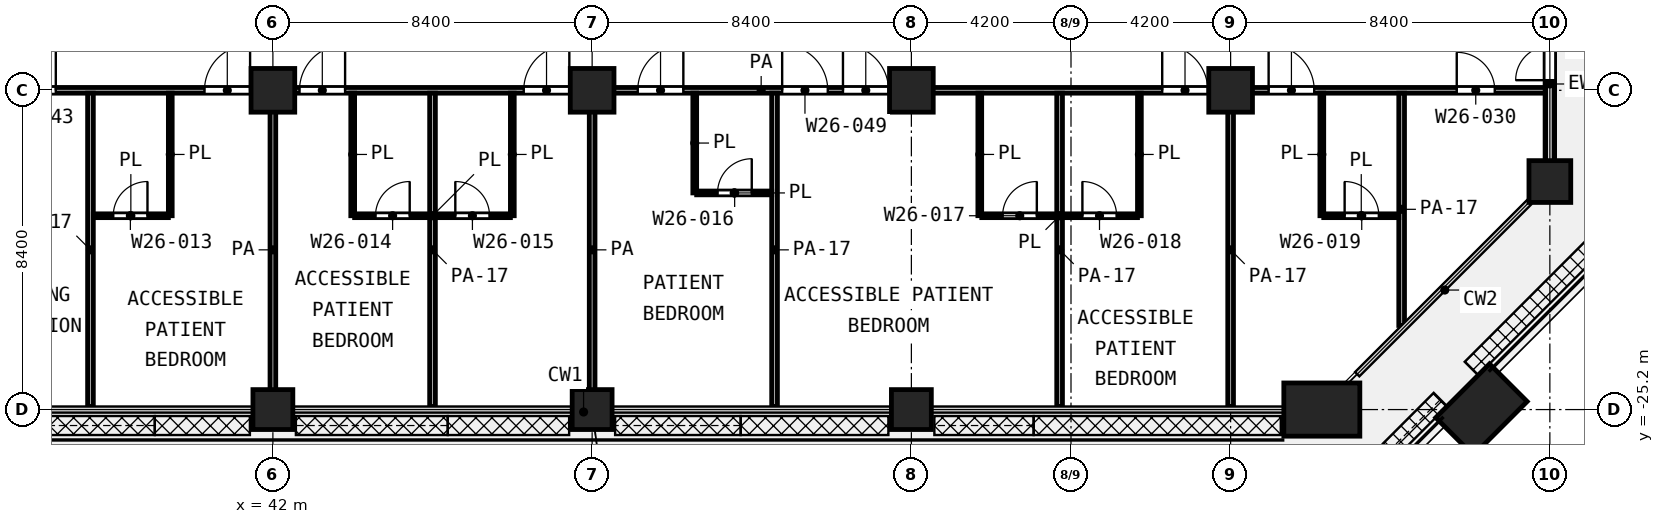
"""IFC4 building model, lengths in metres.
Left out: names, types, materials, properties, quantities, classifications, styles, units other than length and angle.
Written with IfcOpenShell. Run it as: python <this file> out.ifc"""

import sys

from ifc_helpers import new_model, si_unit, direction, frame, frame_2d, origin, origin_2d, place, context, subcontext, project, spatial, rectangle, extrude, element, fill, save


model = new_model("IFC4")
c1 = context("Model", 3, precision=1e-05, world=origin(), true_north=direction((0.0, 1.0)))
c2 = subcontext(c1, "Body", "Model", "MODEL_VIEW")
j1 = project(units=[si_unit("LENGTHUNIT", "METRE"), si_unit("PLANEANGLEUNIT", "RADIAN")], contexts=[c1])
p1 = place(None, origin())
s1 = spatial("IfcSite", under=j1, at=p1, CompositionType="ELEMENT")
p2 = place(p1, origin())
s2 = spatial("IfcBuilding", under=s1, at=p2, CompositionType="ELEMENT")
p3 = place(p2, frame((0.0, 0.0, 115.6)))
s3 = spatial("IfcBuildingStorey", under=s2, at=p3, CompositionType="ELEMENT", Elevation=115.6)
for number, where, z_axis, x_axis in (
    (1, (42.0, -16.8, 0.0), (0.0, 0.0, 1.0), (1.0, 0.0, 0.0)),
    (2, (50.4, -16.8, 0.0), (0.0, 0.0, 1.0), (1.0, 0.0, 0.0)),
    (3, (58.8, -16.8, 0.0), (0.0, 0.0, 1.0), (1.0, 0.0, 0.0)),
    (4, (67.2, -16.8, 0.0), (0.0, 0.0, 1.0), (1.0, 0.0, 0.0)),
):
    element("IfcColumn", number, at=place(p3, frame(where, z_axis=z_axis, x_axis=x_axis)), inside=s3, PredefinedType="COLUMN", context=c2, shape_type="SweptSolid", body=[
        extrude(rectangle(XDim=1.15, YDim=1.15, at=origin_2d()), origin(), (0.0, 0.0, 1.0), 4.2),
    ])
p4 = place(p3, frame((75.6, -19.2, 0.0), z_axis=(0.0, 0.0, 1.0), x_axis=(1.0, 0.0, 0.0)))
e5 = element("IfcColumn", 5, at=p4, inside=s3, PredefinedType="COLUMN", context=c2, shape_type="SweptSolid", body=[
    extrude(rectangle(XDim=1.1, YDim=1.1, at=origin_2d()), origin(), (0.0, 0.0, 1.0), 4.2),
])
for number, where, z_axis, x_axis in (
    (6, (42.0, -25.2, 0.0), (0.0, 0.0, 1.0), (1.0, 0.0, 0.0)),
    (7, (50.4, -25.2, 0.0), (0.0, 0.0, 1.0), (1.0, 0.0, 0.0)),
    (8, (58.8, -25.2, 0.0), (0.0, 0.0, 1.0), (1.0, 0.0, 0.0)),
):
    element("IfcColumn", number, at=place(p3, frame(where, z_axis=z_axis, x_axis=x_axis)), inside=s3, PredefinedType="COLUMN", context=c2, shape_type="SweptSolid", body=[
        extrude(rectangle(XDim=1.05, YDim=1.05, at=origin_2d()), origin(), (0.0, 0.0, 1.0), 4.2),
    ])
for number, where, z_axis, x_axis in (
    (9, (69.6, -25.2, 0.0), (0.0, 0.0, 1.0), (-1.0, 0.0, 0.0)),
    (10, (73.8, -25.2, 0.0), (0.0, 0.0, 1.0), (-0.707, -0.707, 0.0)),
):
    element("IfcColumn", number, at=place(p3, frame(where, z_axis=z_axis, x_axis=x_axis)), inside=s3, PredefinedType="COLUMN", context=c2, shape_type="SweptSolid", body=[
        extrude(rectangle(XDim=2.0, YDim=1.4, at=origin_2d()), origin(), (0.0, 0.0, 1.0), 4.2),
    ])
p5 = place(p3, frame((75.6, -18.65, 0.0), z_axis=(0.0, 0.0, 1.0), x_axis=(0.0, 1.0, 0.0)))
e11 = element("IfcWall", 11, at=p5, inside=s3, PredefinedType="SOLIDWALL", context=c2, shape_type="SweptSolid", body=[
    extrude(rectangle(XDim=4.033, YDim=0.25, at=frame_2d((2.017, 0.0))), origin(), (0.0, 0.0, 1.0), 3.48),
])
p6 = place(p5, frame((2.117, 0.0, 0.0)))
e12 = element("IfcOpeningElement", 12, at=p6, cuts=e11, PredefinedType="OPENING", context=c2, shape_type="SweptSolid", body=[
    extrude(rectangle(XDim=1.8, YDim=2.1, at=frame_2d((0.9, 1.05))), frame((0.0, 0.135, 0.0), z_axis=(0.0, -1.0, 0.0), x_axis=(1.0, 0.0, 0.0)), (0.0, 0.0, 1.0), 0.27),
])
p7 = place(p3, frame((37.275, -20.1, 0.0), z_axis=(0.0, 0.0, 1.0), x_axis=(1.0, 0.0, 0.0)))
e13 = element("IfcWall", 13, at=p7, inside=s3, PredefinedType="PARTITIONING", context=c2, shape_type="SweptSolid", body=[
    extrude(rectangle(XDim=1.975, YDim=0.1, at=frame_2d((0.988, 0.0))), origin(), (0.0, 0.0, 1.0), 3.6),
])
p8 = place(p7, frame((0.525, 0.0, 0.0)))
e14 = element("IfcOpeningElement", 14, at=p8, cuts=e13, PredefinedType="OPENING", context=c2, shape_type="SweptSolid", body=[
    extrude(rectangle(XDim=0.9, YDim=2.1, at=frame_2d((0.45, 1.05))), frame((0.0, 0.06, 0.0), z_axis=(0.0, -1.0, 0.0), x_axis=(1.0, 0.0, 0.0)), (0.0, 0.0, 1.0), 0.12),
])
p9 = place(p3, frame((44.15, -20.1, 0.0), z_axis=(0.0, 0.0, 1.0), x_axis=(1.0, 0.0, 0.0)))
e15 = element("IfcWall", 15, at=p9, inside=s3, PredefinedType="PARTITIONING", context=c2, shape_type="SweptSolid", body=[
    extrude(rectangle(XDim=4.1, YDim=0.1, at=frame_2d((2.05, 0.0))), origin(), (0.0, 0.0, 1.0), 3.6),
])
p10 = place(p9, frame((0.55, 0.0, 0.0)))
e16 = element("IfcOpeningElement", 16, at=p10, cuts=e15, PredefinedType="OPENING", context=c2, shape_type="SweptSolid", body=[
    extrude(rectangle(XDim=0.9, YDim=2.1, at=frame_2d((0.45, 1.05))), frame((0.0, 0.06, 0.0), z_axis=(0.0, -1.0, 0.0), x_axis=(1.0, 0.0, 0.0)), (0.0, 0.0, 1.0), 0.12),
])
p11 = place(p9, frame((2.65, 0.0, 0.0)))
e17 = element("IfcOpeningElement", 17, at=p11, cuts=e15, PredefinedType="OPENING", context=c2, shape_type="SweptSolid", body=[
    extrude(rectangle(XDim=0.9, YDim=2.1, at=frame_2d((0.45, 1.05))), frame((0.0, 0.06, 0.0), z_axis=(0.0, -1.0, 0.0), x_axis=(1.0, 0.0, 0.0)), (0.0, 0.0, 1.0), 0.12),
])
p12 = place(p3, frame((60.652, -20.1, 0.0), z_axis=(0.0, 0.0, 1.0), x_axis=(1.0, 0.0, 0.0)))
e18 = element("IfcWall", 18, at=p12, inside=s3, PredefinedType="PARTITIONING", context=c2, shape_type="SweptSolid", body=[
    extrude(rectangle(XDim=4.098, YDim=0.1, at=frame_2d((2.049, 0.0))), origin(), (0.0, 0.0, 1.0), 3.6),
])
p13 = place(p12, frame((0.549, 0.0, 0.0)))
e19 = element("IfcOpeningElement", 19, at=p13, cuts=e18, PredefinedType="OPENING", context=c2, shape_type="SweptSolid", body=[
    extrude(rectangle(XDim=0.9, YDim=2.1, at=frame_2d((0.45, 1.05))), frame((0.0, 0.06, 0.0), z_axis=(0.0, -1.0, 0.0), x_axis=(1.0, 0.0, 0.0)), (0.0, 0.0, 1.0), 0.12),
])
p14 = place(p12, frame((2.648, 0.0, 0.0)))
e20 = element("IfcOpeningElement", 20, at=p14, cuts=e18, PredefinedType="OPENING", context=c2, shape_type="SweptSolid", body=[
    extrude(rectangle(XDim=0.9, YDim=2.1, at=frame_2d((0.45, 1.05))), frame((0.0, 0.06, 0.0), z_axis=(0.0, -1.0, 0.0), x_axis=(1.0, 0.0, 0.0)), (0.0, 0.0, 1.0), 0.12),
])
p15 = place(p3, frame((69.65, -20.1, 0.0), z_axis=(0.0, 0.0, 1.0), x_axis=(1.0, 0.0, 0.0)))
e21 = element("IfcWall", 21, at=p15, inside=s3, PredefinedType="PARTITIONING", context=c2, shape_type="SweptSolid", body=[
    extrude(rectangle(XDim=1.975, YDim=0.1, at=frame_2d((0.988, 0.0))), origin(), (0.0, 0.0, 1.0), 3.6),
])
p16 = place(p15, frame((0.55, 0.0, 0.0)))
e22 = element("IfcOpeningElement", 22, at=p16, cuts=e21, PredefinedType="OPENING", context=c2, shape_type="SweptSolid", body=[
    extrude(rectangle(XDim=0.9, YDim=2.1, at=frame_2d((0.45, 1.05))), frame((0.0, 0.06, 0.0), z_axis=(0.0, -1.0, 0.0), x_axis=(1.0, 0.0, 0.0)), (0.0, 0.0, 1.0), 0.12),
])
p17 = place(p3, frame((53.15, -19.5, 0.0), z_axis=(0.0, 0.0, 1.0), x_axis=(1.0, 0.0, 0.0)))
e23 = element("IfcWall", 23, at=p17, inside=s3, PredefinedType="PARTITIONING", context=c2, shape_type="SweptSolid", body=[
    extrude(rectangle(XDim=1.975, YDim=0.1, at=frame_2d((0.988, 0.0))), origin(), (0.0, 0.0, 1.0), 3.6),
])
p18 = place(p17, frame((0.55, 0.0, 0.0)))
e24 = element("IfcOpeningElement", 24, at=p18, cuts=e23, PredefinedType="OPENING", context=c2, shape_type="SweptSolid", body=[
    extrude(rectangle(XDim=0.9, YDim=2.1, at=frame_2d((0.45, 1.05))), frame((0.0, 0.06, 0.0), z_axis=(0.0, -1.0, 0.0), x_axis=(1.0, 0.0, 0.0)), (0.0, 0.0, 1.0), 0.12),
])
for number, where, z_axis, x_axis in (
    (25, (39.3, -20.1, 0.0), (0.0, 0.0, 1.0), (0.0, 1.0, 0.0)),
    (26, (44.1, -20.1, 0.0), (0.0, 0.0, 1.0), (0.0, 1.0, 0.0)),
    (27, (48.3, -20.1, 0.0), (0.0, 0.0, 1.0), (0.0, 1.0, 0.0)),
):
    element("IfcWall", number, at=place(p3, frame(where, z_axis=z_axis, x_axis=x_axis)), inside=s3, PredefinedType="PARTITIONING", context=c2, shape_type="SweptSolid", body=[
        extrude(rectangle(XDim=3.225, YDim=0.1, at=frame_2d((1.613, 0.0))), origin(), (0.0, 0.0, 1.0), 3.6),
    ])
p19 = place(p3, frame((53.1, -19.5, 0.0), z_axis=(0.0, 0.0, 1.0), x_axis=(0.0, 1.0, 0.0)))
e28 = element("IfcWall", 28, at=p19, inside=s3, PredefinedType="PARTITIONING", context=c2, shape_type="SweptSolid", body=[
    extrude(rectangle(XDim=2.625, YDim=0.1, at=frame_2d((1.312, 0.0))), origin(), (0.0, 0.0, 1.0), 3.6),
])
p20 = place(p3, frame((60.6, -20.099, 0.0), z_axis=(0.0, 0.0, 1.0), x_axis=(0.0, 1.0, 0.0)))
e29 = element("IfcWall", 29, at=p20, inside=s3, PredefinedType="PARTITIONING", context=c2, shape_type="SweptSolid", body=[
    extrude(rectangle(XDim=3.224, YDim=0.1, at=frame_2d((1.612, 0.0))), origin(), (0.0, 0.0, 1.0), 3.6),
])
for number, where, z_axis, x_axis in (
    (30, (64.8, -20.1, 0.0), (0.0, 0.0, 1.0), (0.0, 1.0, 0.0)),
    (31, (69.6, -20.1, 0.0), (0.0, 0.0, 1.0), (0.0, 1.0, 0.0)),
):
    element("IfcWall", number, at=place(p3, frame(where, z_axis=z_axis, x_axis=x_axis)), inside=s3, PredefinedType="PARTITIONING", context=c2, shape_type="SweptSolid", body=[
        extrude(rectangle(XDim=3.225, YDim=0.1, at=frame_2d((1.613, 0.0))), origin(), (0.0, 0.0, 1.0), 3.6),
    ])
p21 = place(p3, frame((34.175, -16.8, 0.0), z_axis=(0.0, 0.0, 1.0), x_axis=(1.0, 0.0, 0.0)))
e32 = element("IfcWall", 32, at=p21, inside=s3, PredefinedType="PARTITIONING", context=c2, shape_type="SweptSolid", body=[
    extrude(rectangle(XDim=41.345, YDim=0.15, at=frame_2d((20.672, 0.0))), origin(), (0.0, 0.0, 1.0), 3.6),
])
p22 = place(p21, frame((0.913, 0.0, 0.0)))
e33 = element("IfcOpeningElement", 33, at=p22, cuts=e32, PredefinedType="OPENING", context=c2, shape_type="SweptSolid", body=[
    extrude(rectangle(XDim=1.2, YDim=2.1, at=frame_2d((0.6, 1.05))), frame((0.0, 0.085, 0.0), z_axis=(0.0, -1.0, 0.0), x_axis=(1.0, 0.0, 0.0)), (0.0, 0.0, 1.0), 0.17),
])
p23 = place(p21, frame((6.025, 0.0, 0.0)))
e34 = element("IfcOpeningElement", 34, at=p23, cuts=e32, PredefinedType="OPENING", context=c2, shape_type="SweptSolid", body=[
    extrude(rectangle(XDim=1.2, YDim=2.1, at=frame_2d((0.6, 1.05))), frame((0.0, 0.085, 0.0), z_axis=(0.0, -1.0, 0.0), x_axis=(1.0, 0.0, 0.0)), (0.0, 0.0, 1.0), 0.17),
])
p24 = place(p21, frame((8.525, 0.0, 0.0)))
e35 = element("IfcOpeningElement", 35, at=p24, cuts=e32, PredefinedType="OPENING", context=c2, shape_type="SweptSolid", body=[
    extrude(rectangle(XDim=1.2, YDim=2.1, at=frame_2d((0.6, 1.05))), frame((0.0, 0.085, 0.0), z_axis=(0.0, -1.0, 0.0), x_axis=(1.0, 0.0, 0.0)), (0.0, 0.0, 1.0), 0.17),
])
p25 = place(p21, frame((14.425, 0.0, 0.0)))
e36 = element("IfcOpeningElement", 36, at=p25, cuts=e32, PredefinedType="OPENING", context=c2, shape_type="SweptSolid", body=[
    extrude(rectangle(XDim=1.2, YDim=2.1, at=frame_2d((0.6, 1.05))), frame((0.0, 0.085, 0.0), z_axis=(0.0, -1.0, 0.0), x_axis=(1.0, 0.0, 0.0)), (0.0, 0.0, 1.0), 0.17),
])
p26 = place(p21, frame((17.425, 0.0, 0.0)))
e37 = element("IfcOpeningElement", 37, at=p26, cuts=e32, PredefinedType="OPENING", context=c2, shape_type="SweptSolid", body=[
    extrude(rectangle(XDim=1.2, YDim=2.1, at=frame_2d((0.6, 1.05))), frame((0.0, 0.085, 0.0), z_axis=(0.0, -1.0, 0.0), x_axis=(1.0, 0.0, 0.0)), (0.0, 0.0, 1.0), 0.17),
])
p27 = place(p21, frame((22.825, 0.0, 0.0)))
e38 = element("IfcOpeningElement", 38, at=p27, cuts=e32, PredefinedType="OPENING", context=c2, shape_type="SweptSolid", body=[
    extrude(rectangle(XDim=1.2, YDim=2.1, at=frame_2d((0.6, 1.05))), frame((0.0, 0.085, 0.0), z_axis=(0.0, -1.0, 0.0), x_axis=(1.0, 0.0, 0.0)), (0.0, 0.0, 1.0), 0.17),
])
p28 = place(p21, frame((21.225, 0.0, 0.0)))
e39 = element("IfcOpeningElement", 39, at=p28, cuts=e32, PredefinedType="OPENING", context=c2, shape_type="SweptSolid", body=[
    extrude(rectangle(XDim=1.2, YDim=2.1, at=frame_2d((0.6, 1.05))), frame((0.0, 0.085, 0.0), z_axis=(0.0, -1.0, 0.0), x_axis=(1.0, 0.0, 0.0)), (0.0, 0.0, 1.0), 0.17),
])
p29 = place(p21, frame((31.225, 0.0, 0.0)))
e40 = element("IfcOpeningElement", 40, at=p29, cuts=e32, PredefinedType="OPENING", context=c2, shape_type="SweptSolid", body=[
    extrude(rectangle(XDim=1.2, YDim=2.1, at=frame_2d((0.6, 1.05))), frame((0.0, 0.085, 0.0), z_axis=(0.0, -1.0, 0.0), x_axis=(1.0, 0.0, 0.0)), (0.0, 0.0, 1.0), 0.17),
])
p30 = place(p21, frame((34.025, 0.0, 0.0)))
e41 = element("IfcOpeningElement", 41, at=p30, cuts=e32, PredefinedType="OPENING", context=c2, shape_type="SweptSolid", body=[
    extrude(rectangle(XDim=1.2, YDim=2.1, at=frame_2d((0.6, 1.05))), frame((0.0, 0.085, 0.0), z_axis=(0.0, -1.0, 0.0), x_axis=(1.0, 0.0, 0.0)), (0.0, 0.0, 1.0), 0.17),
])
p31 = place(p21, frame((38.975, 0.0, 0.0)))
e42 = element("IfcOpeningElement", 42, at=p31, cuts=e32, PredefinedType="OPENING", context=c2, shape_type="SweptSolid", body=[
    extrude(rectangle(XDim=1.0, YDim=2.1, at=frame_2d((0.5, 1.05))), frame((0.0, 0.085, 0.0), z_axis=(0.0, -1.0, 0.0), x_axis=(1.0, 0.0, 0.0)), (0.0, 0.0, 1.0), 0.17),
])
p32 = place(p3, frame((37.2, -25.12, 0.0), z_axis=(0.0, 0.0, 1.0), x_axis=(0.0, 1.0, 0.0)))
e43 = element("IfcWall", 43, at=p32, inside=s3, PredefinedType="PARTITIONING", context=c2, shape_type="SweptSolid", body=[
    extrude(rectangle(XDim=8.245, YDim=0.15, at=frame_2d((4.123, 0.0))), origin(), (0.0, 0.0, 1.0), 2.7),
])
p33 = place(p3, frame((42.0, -25.12, 0.0), z_axis=(0.0, 0.0, 1.0), x_axis=(0.0, 1.0, 0.0)))
e44 = element("IfcWall", 44, at=p33, inside=s3, PredefinedType="PARTITIONING", context=c2, shape_type="SweptSolid", body=[
    extrude(rectangle(XDim=8.245, YDim=0.15, at=frame_2d((4.123, 0.0))), origin(), (0.0, 0.0, 1.0), 3.6),
])
p34 = place(p3, frame((46.2, -25.12, 0.0), z_axis=(0.0, 0.0, 1.0), x_axis=(0.0, 1.0, 0.0)))
e45 = element("IfcWall", 45, at=p34, inside=s3, PredefinedType="PARTITIONING", context=c2, shape_type="SweptSolid", body=[
    extrude(rectangle(XDim=8.245, YDim=0.15, at=frame_2d((4.123, 0.0))), origin(), (0.0, 0.0, 1.0), 2.7),
])
p35 = place(p3, frame((50.4, -25.12, 0.0), z_axis=(0.0, 0.0, 1.0), x_axis=(0.0, 1.0, 0.0)))
e46 = element("IfcWall", 46, at=p35, inside=s3, PredefinedType="PARTITIONING", context=c2, shape_type="SweptSolid", body=[
    extrude(rectangle(XDim=8.245, YDim=0.15, at=frame_2d((4.123, 0.0))), origin(), (0.0, 0.0, 1.0), 3.6),
])
for number, where, z_axis, x_axis in (
    (47, (55.2, -25.12, 0.0), (0.0, 0.0, 1.0), (0.0, 1.0, 0.0)),
    (48, (62.7, -25.12, 0.0), (0.0, 0.0, 1.0), (0.0, 1.0, 0.0)),
    (49, (67.2, -25.12, 0.0), (0.0, 0.0, 1.0), (0.0, 1.0, 0.0)),
):
    element("IfcWall", number, at=place(p3, frame(where, z_axis=z_axis, x_axis=x_axis)), inside=s3, PredefinedType="PARTITIONING", context=c2, shape_type="SweptSolid", body=[
        extrude(rectangle(XDim=8.245, YDim=0.15, at=frame_2d((4.123, 0.0))), origin(), (0.0, 0.0, 1.0), 2.7),
    ])
p36 = place(p3, frame((71.7, -22.987, 0.0), z_axis=(0.0, 0.0, 1.0), x_axis=(0.0, 1.0, 0.0)))
e50 = element("IfcWall", 50, at=p36, inside=s3, PredefinedType="PARTITIONING", context=c2, shape_type="SweptSolid", body=[
    extrude(rectangle(XDim=6.112, YDim=0.15, at=frame_2d((3.056, 0.0))), origin(), (0.0, 0.0, 1.0), 2.7),
])
p37 = place(p6, origin())
e51 = element("IfcDoor", 51, at=p37, inside=s3, OperationType="DOUBLE_DOOR_SINGLE_SWING", PredefinedType="DOOR", context=c2, shape_type="SweptSolid", body=[
    extrude(rectangle(XDim=1.8, YDim=2.1, at=frame_2d((0.9, 1.05))), frame((0.0, 0.025, 0.0), z_axis=(0.0, -1.0, 0.0), x_axis=(1.0, 0.0, 0.0)), (0.0, 0.0, 1.0), 0.05),
])
fill(e12, e51)
p38 = place(p22, origin())
e52 = element("IfcDoor", 52, at=p38, inside=s3, OperationType="SINGLE_SWING_RIGHT", PredefinedType="DOOR", context=c2, shape_type="SweptSolid", body=[
    extrude(rectangle(XDim=1.2, YDim=2.1, at=frame_2d((0.6, 1.05))), frame((0.0, 0.025, 0.0), z_axis=(0.0, -1.0, 0.0), x_axis=(1.0, 0.0, 0.0)), (0.0, 0.0, 1.0), 0.05),
])
fill(e33, e52)
p39 = place(p23, origin())
e53 = element("IfcDoor", 53, at=p39, inside=s3, OperationType="SINGLE_SWING_RIGHT", PredefinedType="DOOR", context=c2, shape_type="SweptSolid", body=[
    extrude(rectangle(XDim=1.2, YDim=2.1, at=frame_2d((0.6, 1.05))), frame((0.0, 0.025, 0.0), z_axis=(0.0, -1.0, 0.0), x_axis=(1.0, 0.0, 0.0)), (0.0, 0.0, 1.0), 0.05),
])
fill(e34, e53)
p40 = place(p8, origin())
e54 = element("IfcDoor", 54, at=p40, inside=s3, OperationType="SINGLE_SWING_RIGHT", PredefinedType="DOOR", context=c2, shape_type="SweptSolid", body=[
    extrude(rectangle(XDim=0.9, YDim=2.1, at=frame_2d((0.45, 1.05))), frame((0.0, 0.025, 0.0), z_axis=(0.0, -1.0, 0.0), x_axis=(1.0, 0.0, 0.0)), (0.0, 0.0, 1.0), 0.05),
])
fill(e14, e54)
p41 = place(p24, origin())
e55 = element("IfcDoor", 55, at=p41, inside=s3, OperationType="SINGLE_SWING_RIGHT", PredefinedType="DOOR", context=c2, shape_type="SweptSolid", body=[
    extrude(rectangle(XDim=1.2, YDim=2.1, at=frame_2d((0.6, 1.05))), frame((0.0, 0.025, 0.0), z_axis=(0.0, -1.0, 0.0), x_axis=(1.0, 0.0, 0.0)), (0.0, 0.0, 1.0), 0.05),
])
fill(e35, e55)
p42 = place(p10, origin())
e56 = element("IfcDoor", 56, at=p42, inside=s3, OperationType="SINGLE_SWING_RIGHT", PredefinedType="DOOR", context=c2, shape_type="SweptSolid", body=[
    extrude(rectangle(XDim=0.9, YDim=2.1, at=frame_2d((0.45, 1.05))), frame((0.0, 0.025, 0.0), z_axis=(0.0, -1.0, 0.0), x_axis=(1.0, 0.0, 0.0)), (0.0, 0.0, 1.0), 0.05),
])
fill(e16, e56)
p43 = place(p25, origin())
e57 = element("IfcDoor", 57, at=p43, inside=s3, OperationType="SINGLE_SWING_RIGHT", PredefinedType="DOOR", context=c2, shape_type="SweptSolid", body=[
    extrude(rectangle(XDim=1.2, YDim=2.1, at=frame_2d((0.6, 1.05))), frame((0.0, 0.025, 0.0), z_axis=(0.0, -1.0, 0.0), x_axis=(1.0, 0.0, 0.0)), (0.0, 0.0, 1.0), 0.05),
])
fill(e36, e57)
p44 = place(p11, origin())
e58 = element("IfcDoor", 58, at=p44, inside=s3, OperationType="SINGLE_SWING_LEFT", PredefinedType="DOOR", context=c2, shape_type="SweptSolid", body=[
    extrude(rectangle(XDim=0.9, YDim=2.1, at=frame_2d((0.45, 1.05))), frame((0.0, 0.025, 0.0), z_axis=(0.0, -1.0, 0.0), x_axis=(1.0, 0.0, 0.0)), (0.0, 0.0, 1.0), 0.05),
])
fill(e17, e58)
p45 = place(p26, origin())
e59 = element("IfcDoor", 59, at=p45, inside=s3, OperationType="SINGLE_SWING_RIGHT", PredefinedType="DOOR", context=c2, shape_type="SweptSolid", body=[
    extrude(rectangle(XDim=1.2, YDim=2.1, at=frame_2d((0.6, 1.05))), frame((0.0, 0.025, 0.0), z_axis=(0.0, -1.0, 0.0), x_axis=(1.0, 0.0, 0.0)), (0.0, 0.0, 1.0), 0.05),
])
fill(e37, e59)
p46 = place(p18, origin())
e60 = element("IfcDoor", 60, at=p46, inside=s3, OperationType="SINGLE_SWING_RIGHT", PredefinedType="DOOR", context=c2, shape_type="SweptSolid", body=[
    extrude(rectangle(XDim=0.9, YDim=2.1, at=frame_2d((0.45, 1.05))), frame((0.0, 0.025, 0.0), z_axis=(0.0, -1.0, 0.0), x_axis=(1.0, 0.0, 0.0)), (0.0, 0.0, 1.0), 0.05),
])
fill(e24, e60)
p47 = place(p27, origin())
e61 = element("IfcDoor", 61, at=p47, inside=s3, OperationType="SINGLE_SWING_LEFT", PredefinedType="DOOR", context=c2, shape_type="SweptSolid", body=[
    extrude(rectangle(XDim=1.2, YDim=2.1, at=frame_2d((0.6, 1.05))), frame((0.0, 0.025, 0.0), z_axis=(0.0, -1.0, 0.0), x_axis=(1.0, 0.0, 0.0)), (0.0, 0.0, 1.0), 0.05),
])
fill(e38, e61)
p48 = place(p28, origin())
e62 = element("IfcDoor", 62, at=p48, inside=s3, OperationType="SINGLE_SWING_LEFT", PredefinedType="DOOR", context=c2, shape_type="SweptSolid", body=[
    extrude(rectangle(XDim=1.2, YDim=2.1, at=frame_2d((0.6, 1.05))), frame((0.0, 0.025, 0.0), z_axis=(0.0, -1.0, 0.0), x_axis=(1.0, 0.0, 0.0)), (0.0, 0.0, 1.0), 0.05),
])
fill(e39, e62)
p49 = place(p13, origin())
e63 = element("IfcDoor", 63, at=p49, inside=s3, OperationType="SINGLE_SWING_RIGHT", PredefinedType="DOOR", context=c2, shape_type="SweptSolid", body=[
    extrude(rectangle(XDim=0.9, YDim=2.1, at=frame_2d((0.45, 1.05))), frame((0.0, 0.025, 0.0), z_axis=(0.0, -1.0, 0.0), x_axis=(1.0, 0.0, 0.0)), (0.0, 0.0, 1.0), 0.05),
])
fill(e19, e63)
p50 = place(p29, origin())
e64 = element("IfcDoor", 64, at=p50, inside=s3, OperationType="SINGLE_SWING_LEFT", PredefinedType="DOOR", context=c2, shape_type="SweptSolid", body=[
    extrude(rectangle(XDim=1.2, YDim=2.1, at=frame_2d((0.6, 1.05))), frame((0.0, 0.025, 0.0), z_axis=(0.0, -1.0, 0.0), x_axis=(1.0, 0.0, 0.0)), (0.0, 0.0, 1.0), 0.05),
])
fill(e40, e64)
p51 = place(p14, origin())
e65 = element("IfcDoor", 65, at=p51, inside=s3, OperationType="SINGLE_SWING_LEFT", PredefinedType="DOOR", context=c2, shape_type="SweptSolid", body=[
    extrude(rectangle(XDim=0.9, YDim=2.1, at=frame_2d((0.45, 1.05))), frame((0.0, 0.025, 0.0), z_axis=(0.0, -1.0, 0.0), x_axis=(1.0, 0.0, 0.0)), (0.0, 0.0, 1.0), 0.05),
])
fill(e20, e65)
p52 = place(p30, origin())
e66 = element("IfcDoor", 66, at=p52, inside=s3, OperationType="SINGLE_SWING_LEFT", PredefinedType="DOOR", context=c2, shape_type="SweptSolid", body=[
    extrude(rectangle(XDim=1.2, YDim=2.1, at=frame_2d((0.6, 1.05))), frame((0.0, 0.025, 0.0), z_axis=(0.0, -1.0, 0.0), x_axis=(1.0, 0.0, 0.0)), (0.0, 0.0, 1.0), 0.05),
])
fill(e41, e66)
p53 = place(p16, origin())
e67 = element("IfcDoor", 67, at=p53, inside=s3, OperationType="SINGLE_SWING_LEFT", PredefinedType="DOOR", context=c2, shape_type="SweptSolid", body=[
    extrude(rectangle(XDim=0.9, YDim=2.1, at=frame_2d((0.45, 1.05))), frame((0.0, 0.025, 0.0), z_axis=(0.0, -1.0, 0.0), x_axis=(1.0, 0.0, 0.0)), (0.0, 0.0, 1.0), 0.05),
])
fill(e22, e67)
p54 = place(p31, origin())
e68 = element("IfcDoor", 68, at=p54, inside=s3, OperationType="SINGLE_SWING_LEFT", PredefinedType="DOOR", context=c2, shape_type="SweptSolid", body=[
    extrude(rectangle(XDim=1.0, YDim=2.1, at=frame_2d((0.5, 1.05))), frame((0.0, 0.025, 0.0), z_axis=(0.0, -1.0, 0.0), x_axis=(1.0, 0.0, 0.0)), (0.0, 0.0, 1.0), 0.05),
])
fill(e42, e68)
save(model, sys.argv[1])
